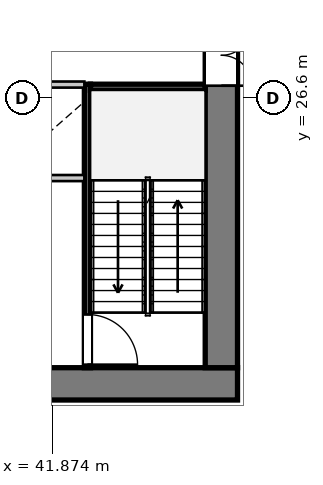
"""IFC4 building model, lengths in metres.
Left out: names, types, materials, properties, quantities, classifications, styles, units other than length and angle.
Written with IfcOpenShell. Run it as: python <this file> out.ifc"""

import sys

from ifc_helpers import new_model, si_unit, direction, frame, frame_2d, origin, place, context, subcontext, project, spatial, rectangle, extrude, source, transform, mapped, element, fill, save


model = new_model("IFC4")
c1 = context("Model", 3, precision=1e-05, world=origin(), true_north=direction((0.0, 1.0)))
c2 = subcontext(c1, "Body", "Model", "MODEL_VIEW")
j1 = project(units=[si_unit("LENGTHUNIT", "METRE"), si_unit("PLANEANGLEUNIT", "RADIAN")], contexts=[c1])
p1 = place(None, origin())
s1 = spatial("IfcSite", under=j1, at=p1, CompositionType="ELEMENT")
p2 = place(p1, origin())
s2 = spatial("IfcBuilding", under=s1, at=p2, CompositionType="ELEMENT")
p3 = place(p2, frame((0.0, 0.0, 20.1)))
s3 = spatial("IfcBuildingStorey", under=s2, at=p3, CompositionType="ELEMENT", Elevation=20.1)
p4 = place(p3, frame((46.75, 19.075, 0.0), z_axis=(0.0, 0.0, 1.0), x_axis=(-1.0, 0.0, 0.0)))
e1 = element("IfcWall", 1, at=p4, inside=s3, PredefinedType="SHEAR", context=c2, shape_type="SweptSolid", body=[
    extrude(rectangle(XDim=17.5, YDim=0.85, at=frame_2d((8.75, 0.0))), origin(), (0.0, 0.0, 1.0), 4.08),
])
p5 = place(p4, frame((4.95, 0.0, 0.0)))
e2 = element("IfcOpeningElement", 2, at=p5, cuts=e1, PredefinedType="OPENING", context=c2, shape_type="SweptSolid", body=[
    extrude(rectangle(XDim=1.12, YDim=2.25, at=frame_2d((0.56, 1.125))), frame((0.0, 0.435, 0.0), z_axis=(0.0, -1.0, 0.0), x_axis=(1.0, 0.0, 0.0)), (0.0, 0.0, 1.0), 0.87),
])
p6 = place(p4, frame((11.45, 0.0, 0.0)))
e3 = element("IfcOpeningElement", 3, at=p6, cuts=e1, PredefinedType="OPENING", context=c2, shape_type="SweptSolid", body=[
    extrude(rectangle(XDim=1.12, YDim=2.25, at=frame_2d((0.56, 1.125))), frame((0.0, 0.435, 0.0), z_axis=(0.0, -1.0, 0.0), x_axis=(1.0, 0.0, 0.0)), (0.0, 0.0, 1.0), 0.87),
])
p7 = place(p3, frame((46.325, 33.7, 0.0), z_axis=(0.0, 0.0, 1.0), x_axis=(0.0, -1.0, 0.0)))
e4 = element("IfcWall", 4, at=p7, inside=s3, PredefinedType="SHEAR", context=c2, shape_type="SweptSolid", body=[
    extrude(rectangle(XDim=14.2, YDim=0.85, at=frame_2d((7.1, 0.0))), origin(), (0.0, 0.0, 1.0), 4.08),
])
p8 = place(p7, frame((5.18, 0.0, 0.0)))
e5 = element("IfcOpeningElement", 5, at=p8, cuts=e4, PredefinedType="OPENING", context=c2, shape_type="SweptSolid", body=[
    extrude(rectangle(XDim=1.6, YDim=2.2, at=frame_2d((0.8, 1.1))), frame((0.0, 0.435, 0.0), z_axis=(0.0, -1.0, 0.0), x_axis=(1.0, 0.0, 0.0)), (0.0, 0.0, 1.0), 0.87),
])
p9 = place(p3, frame((42.8, 26.96, 0.0), z_axis=(0.0, 0.0, 1.0), x_axis=(0.0, -1.0, 0.0)))
e6 = element("IfcWall", 6, at=p9, inside=s3, PredefinedType="PARTITIONING", context=c2, shape_type="SweptSolid", body=[
    extrude(rectangle(XDim=7.46, YDim=0.16, at=frame_2d((3.73, 0.0))), origin(), (0.0, 0.0, 1.0), 4.08),
])
p10 = place(p9, frame((6.06, 0.0, 0.0)))
e7 = element("IfcOpeningElement", 7, at=p10, cuts=e6, PredefinedType="OPENING", context=c2, shape_type="SweptSolid", body=[
    extrude(rectangle(XDim=1.32, YDim=2.2, at=frame_2d((0.66, 1.1))), frame((0.0, 0.09, 0.0), z_axis=(0.0, -1.0, 0.0), x_axis=(1.0, 0.0, 0.0)), (0.0, 0.0, 1.0), 0.18),
])
p11 = place(p3, frame((42.88, 26.88, 0.0), z_axis=(0.0, 0.0, 1.0), x_axis=(1.0, 0.0, 0.0)))
e8 = element("IfcWall", 8, at=p11, inside=s3, PredefinedType="PARTITIONING", context=c2, shape_type="SweptSolid", body=[
    extrude(rectangle(XDim=3.02, YDim=0.16, at=frame_2d((1.51, 0.0))), origin(), (0.0, 0.0, 1.0), 4.08),
])
p12 = place(p3, frame((33.28, 24.49, 0.0), z_axis=(0.0, 0.0, 1.0), x_axis=(1.0, 0.0, 0.0)))
e9 = element("IfcWall", 9, at=p12, inside=s3, PredefinedType="PARTITIONING", context=c2, shape_type="SweptSolid", body=[
    extrude(rectangle(XDim=9.44, YDim=0.16, at=frame_2d((4.72, 0.0))), origin(), (0.0, 0.0, 1.0), 4.08),
])
p13 = place(p3, frame((33.28, 26.95, 0.0), z_axis=(0.0, 0.0, 1.0), x_axis=(1.0, 0.0, 0.0)))
e10 = element("IfcWall", 10, at=p13, inside=s3, PredefinedType="PARTITIONING", context=c2, shape_type="SweptSolid", body=[
    extrude(rectangle(XDim=9.44, YDim=0.16, at=frame_2d((4.72, 0.0))), origin(), (0.0, 0.0, 1.0), 4.08),
])
p14 = place(p13, frame((0.26, 0.0, 0.0)))
e11 = element("IfcOpeningElement", 11, at=p14, cuts=e10, PredefinedType="OPENING", context=c2, shape_type="SweptSolid", body=[
    extrude(rectangle(XDim=1.1, YDim=2.2, at=frame_2d((0.55, 1.1))), frame((0.0, 0.09, 0.0), z_axis=(0.0, -1.0, 0.0), x_axis=(1.0, 0.0, 0.0)), (0.0, 0.0, 1.0), 0.18),
])
p15 = place(p13, frame((2.01, 0.0, 0.0)))
e12 = element("IfcOpeningElement", 12, at=p15, cuts=e10, PredefinedType="OPENING", context=c2, shape_type="SweptSolid", body=[
    extrude(rectangle(XDim=1.1, YDim=2.2, at=frame_2d((0.55, 1.1))), frame((0.0, 0.09, 0.0), z_axis=(0.0, -1.0, 0.0), x_axis=(1.0, 0.0, 0.0)), (0.0, 0.0, 1.0), 0.18),
])
p16 = place(p13, frame((3.76, 0.0, 0.0)))
e13 = element("IfcOpeningElement", 13, at=p16, cuts=e10, PredefinedType="OPENING", context=c2, shape_type="SweptSolid", body=[
    extrude(rectangle(XDim=1.1, YDim=2.2, at=frame_2d((0.55, 1.1))), frame((0.0, 0.09, 0.0), z_axis=(0.0, -1.0, 0.0), x_axis=(1.0, 0.0, 0.0)), (0.0, 0.0, 1.0), 0.18),
])
p17 = place(p13, frame((5.51, 0.0, 0.0)))
e14 = element("IfcOpeningElement", 14, at=p17, cuts=e10, PredefinedType="OPENING", context=c2, shape_type="SweptSolid", body=[
    extrude(rectangle(XDim=1.1, YDim=2.2, at=frame_2d((0.55, 1.1))), frame((0.0, 0.09, 0.0), z_axis=(0.0, -1.0, 0.0), x_axis=(1.0, 0.0, 0.0)), (0.0, 0.0, 1.0), 0.18),
])
m1 = source(origin(), c2, "Body", "SweptSolid", [
    extrude(rectangle(XDim=1.6, YDim=2.2, at=frame_2d((0.8, 1.1))), frame((0.0, 0.025, 0.0), z_axis=(0.0, -1.0, 0.0), x_axis=(1.0, 0.0, 0.0)), (0.0, 0.0, 1.0), 0.05),
])
p18 = place(p8, origin())
e15 = element("IfcDoor", 15, at=p18, inside=s3, OperationType="DOUBLE_DOOR_SINGLE_SWING", PredefinedType="DOOR", context=c2, shape_type="MappedRepresentation", body=[
    mapped(m1, transform((0.0, 0.0, 0.0), x_axis=(1.0, 0.0, 0.0), y_axis=(0.0, 1.0, 0.0), z_axis=(0.0, 0.0, 1.0), scale=1.0)),
])
fill(e5, e15)
m2 = source(origin(), c2, "Body", "SweptSolid", [
    extrude(rectangle(XDim=1.32, YDim=2.2, at=frame_2d((0.66, 1.1))), frame((0.0, 0.025, 0.0), z_axis=(0.0, -1.0, 0.0), x_axis=(1.0, 0.0, 0.0)), (0.0, 0.0, 1.0), 0.05),
])
p19 = place(p10, origin())
e16 = element("IfcDoor", 16, at=p19, inside=s3, OperationType="SINGLE_SWING_RIGHT", PredefinedType="DOOR", context=c2, shape_type="MappedRepresentation", body=[
    mapped(m2, transform((0.0, 0.0, 0.0), x_axis=(1.0, 0.0, 0.0), y_axis=(0.0, 1.0, 0.0), z_axis=(0.0, 0.0, 1.0), scale=1.0)),
])
fill(e7, e16)
save(model, sys.argv[1])
